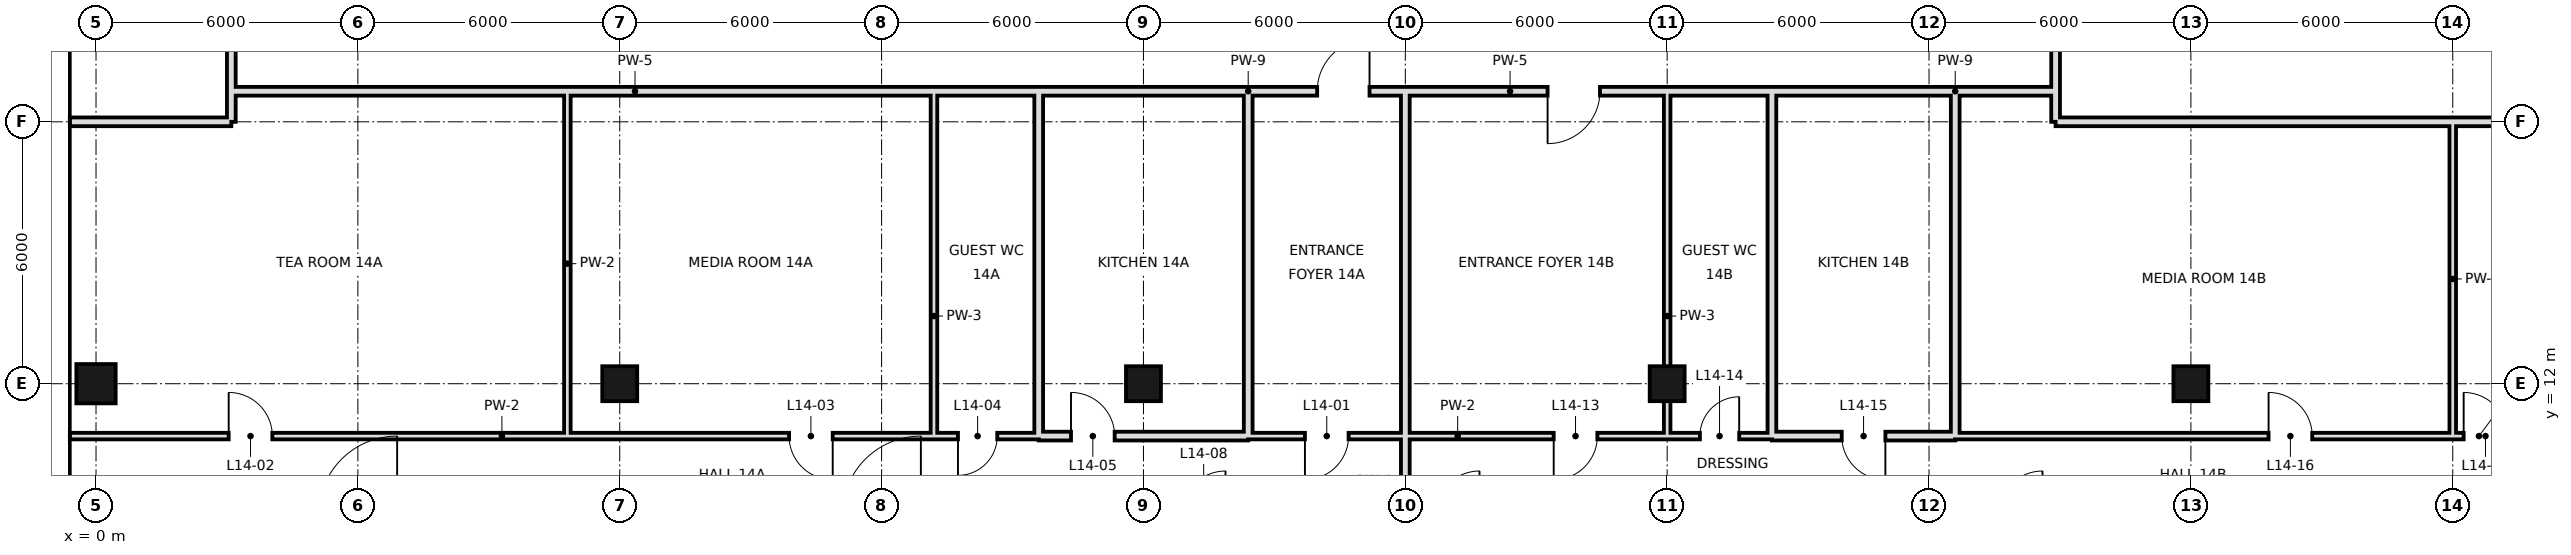
"""IFC4 building model, lengths in metres.
Left out: names, types, materials, properties, quantities, classifications, styles, units other than length and angle.
Written with IfcOpenShell. Run it as: python <this file> out.ifc"""

import sys

from ifc_helpers import new_model, si_unit, direction, frame, frame_2d, origin, origin_2d, place, context, subcontext, project, spatial, rectangle, hollow_rectangle, extrude, element, fill, save


model = new_model("IFC4")
c1 = context("Model", 3, precision=1e-05, world=origin(), true_north=direction((0.0, 1.0)))
c2 = subcontext(c1, "Body", "Model", "MODEL_VIEW")
j1 = project(units=[si_unit("LENGTHUNIT", "METRE"), si_unit("PLANEANGLEUNIT", "RADIAN")], contexts=[c1])
p1 = place(None, origin())
s1 = spatial("IfcSite", under=j1, at=p1, CompositionType="ELEMENT")
p2 = place(p1, origin())
s2 = spatial("IfcBuilding", under=s1, at=p2, CompositionType="ELEMENT")
p3 = place(p2, frame((0.0, 0.0, 71.4)))
s3 = spatial("IfcBuildingStorey", under=s2, at=p3, CompositionType="ELEMENT", Elevation=71.4)
p4 = place(p3, frame((0.0, 12.0, 0.0), z_axis=(0.0, 0.0, 1.0), x_axis=(1.0, 0.0, 0.0)))
e1 = element("IfcColumn", 1, at=p4, inside=s3, PredefinedType="COLUMN", context=c2, shape_type="SweptSolid", body=[
    extrude(hollow_rectangle(XDim=0.9, YDim=0.9, WallThickness=0.045, at=origin_2d()), origin(), (0.0, 0.0, 1.0), 3.6),
])
for number, where, z_axis, x_axis in (
    (2, (12.0, 12.0, 0.0), (0.0, 0.0, 1.0), (1.0, 0.0, 0.0)),
    (3, (24.0, 12.0, 0.0), (0.0, 0.0, 1.0), (1.0, 0.0, 0.0)),
    (4, (36.0, 12.0, 0.0), (0.0, 0.0, 1.0), (1.0, 0.0, 0.0)),
    (5, (48.0, 12.0, 0.0), (0.0, 0.0, 1.0), (1.0, 0.0, 0.0)),
):
    element("IfcColumn", number, at=place(p3, frame(where, z_axis=z_axis, x_axis=x_axis)), inside=s3, PredefinedType="COLUMN", context=c2, shape_type="SweptSolid", body=[
        extrude(hollow_rectangle(XDim=0.8, YDim=0.8, WallThickness=0.04, at=origin_2d()), origin(), (0.0, 0.0, 1.0), 3.6),
    ])
for number, where, z_axis, x_axis in (
    (6, (10.8, 10.8, 0.0), (0.0, 0.0, 1.0), (0.0, 1.0, 0.0)),
    (7, (19.2, 10.8, 0.0), (0.0, 0.0, 1.0), (0.0, 1.0, 0.0)),
):
    element("IfcWall", number, at=place(p3, frame(where, z_axis=z_axis, x_axis=x_axis)), inside=s3, PredefinedType="PARTITIONING", context=c2, shape_type="SweptSolid", body=[
        extrude(rectangle(XDim=7.9, YDim=0.15, at=frame_2d((3.95, 0.0))), origin(), (0.0, 0.0, 1.0), 3.42),
    ])
for number, where, z_axis, x_axis in (
    (8, (21.6, 10.8, 0.0), (0.0, 0.0, 1.0), (0.0, 1.0, 0.0)),
    (9, (26.4, 10.8, 0.0), (0.0, 0.0, 1.0), (0.0, 1.0, 0.0)),
):
    element("IfcWall", number, at=place(p3, frame(where, z_axis=z_axis, x_axis=x_axis)), inside=s3, PredefinedType="SOLIDWALL", context=c2, shape_type="SweptSolid", body=[
        extrude(rectangle(XDim=7.9, YDim=0.2, at=frame_2d((3.95, 0.0))), origin(), (0.0, 0.0, 1.0), 2.72),
    ])
p5 = place(p3, frame((3.1, 18.0, 0.0), z_axis=(0.0, 0.0, 1.0), x_axis=(0.0, 1.0, 0.0)))
e10 = element("IfcWall", 10, at=p5, inside=s3, PredefinedType="SOLIDWALL", context=c2, shape_type="SweptSolid", body=[
    extrude(rectangle(XDim=27.949, YDim=0.2, at=frame_2d((13.975, 0.0))), origin(), (0.0, 0.0, 1.0), 2.97),
])
p6 = place(p5, frame((8.36, 0.0, 0.0)))
e11 = element("IfcOpeningElement", 11, at=p6, cuts=e10, PredefinedType="OPENING", context=c2, shape_type="SweptSolid", body=[
    extrude(rectangle(XDim=1.2, YDim=2.4, at=frame_2d((0.6, 1.2))), frame((0.0, 0.11, 0.0), z_axis=(0.0, -1.0, 0.0), x_axis=(1.0, 0.0, 0.0)), (0.0, 0.0, 1.0), 0.22),
])
p7 = place(p3, frame((30.0, -0.6, 0.0), z_axis=(0.0, 0.0, 1.0), x_axis=(0.0, 1.0, 0.0)))
e12 = element("IfcWall", 12, at=p7, inside=s3, PredefinedType="SOLIDWALL", context=c2, shape_type="SweptSolid", body=[
    extrude(rectangle(XDim=19.3, YDim=0.2, at=frame_2d((9.65, 0.0))), origin(), (0.0, 0.0, 1.0), 2.72),
])
p8 = place(p3, frame((36.0, 10.8, 0.0), z_axis=(0.0, 0.0, 1.0), x_axis=(0.0, 1.0, 0.0)))
e13 = element("IfcWall", 13, at=p8, inside=s3, PredefinedType="PARTITIONING", context=c2, shape_type="SweptSolid", body=[
    extrude(rectangle(XDim=7.9, YDim=0.15, at=frame_2d((3.95, 0.0))), origin(), (0.0, 0.0, 1.0), 2.72),
])
for number, where, z_axis, x_axis in (
    (14, (38.4, 10.8, 0.0), (0.0, 0.0, 1.0), (0.0, 1.0, 0.0)),
    (15, (42.6, 10.8, 0.0), (0.0, 0.0, 1.0), (0.0, 1.0, 0.0)),
):
    element("IfcWall", number, at=place(p3, frame(where, z_axis=z_axis, x_axis=x_axis)), inside=s3, PredefinedType="SOLIDWALL", context=c2, shape_type="SweptSolid", body=[
        extrude(rectangle(XDim=7.9, YDim=0.2, at=frame_2d((3.95, 0.0))), origin(), (0.0, 0.0, 1.0), 2.72),
    ])
p9 = place(p3, frame((44.9, 18.7, 0.0), z_axis=(0.0, 0.0, 1.0), x_axis=(0.0, 1.0, 0.0)))
e16 = element("IfcWall", 16, at=p9, inside=s3, PredefinedType="SOLIDWALL", context=c2, shape_type="SweptSolid", body=[
    extrude(rectangle(XDim=7.1, YDim=0.2, at=frame_2d((3.55, 0.0))), origin(), (0.0, 0.0, 1.0), 3.42),
])
p10 = place(p3, frame((44.9, 18.0, 0.0), z_axis=(0.0, 0.0, 1.0), x_axis=(0.0, 1.0, 0.0)))
e17 = element("IfcWall", 17, at=p10, inside=s3, PredefinedType="SOLIDWALL", context=c2, shape_type="SweptSolid", body=[
    extrude(rectangle(XDim=0.7, YDim=0.2, at=frame_2d((0.35, 0.0))), origin(), (0.0, 0.0, 1.0), 2.97),
])
p11 = place(p3, frame((54.0, 10.8, 0.0), z_axis=(0.0, 0.0, 1.0), x_axis=(0.0, 1.0, 0.0)))
e18 = element("IfcWall", 18, at=p11, inside=s3, PredefinedType="PARTITIONING", context=c2, shape_type="SweptSolid", body=[
    extrude(rectangle(XDim=7.2, YDim=0.15, at=frame_2d((3.6, 0.0))), origin(), (0.0, 0.0, 1.0), 3.42),
])
p12 = place(p3, frame((21.6, 10.8, 0.0), z_axis=(0.0, 0.0, 1.0), x_axis=(1.0, 0.0, 0.0)))
e19 = element("IfcWall", 19, at=p12, inside=s3, PredefinedType="SOLIDWALL", context=c2, shape_type="SweptSolid", body=[
    extrude(rectangle(XDim=4.8, YDim=0.2, at=frame_2d((2.4, 0.0))), origin(), (0.0, 0.0, 1.0), 2.72),
])
p13 = place(p12, frame((0.74, 0.0, 0.0)))
e20 = element("IfcOpeningElement", 20, at=p13, cuts=e19, PredefinedType="OPENING", context=c2, shape_type="SweptSolid", body=[
    extrude(rectangle(XDim=1.0, YDim=2.4, at=frame_2d((0.5, 1.2))), frame((0.0, 0.11, 0.0), z_axis=(0.0, -1.0, 0.0), x_axis=(1.0, 0.0, 0.0)), (0.0, 0.0, 1.0), 0.22),
])
p14 = place(p3, frame((38.4, 10.8, 0.0), z_axis=(0.0, 0.0, 1.0), x_axis=(1.0, 0.0, 0.0)))
e21 = element("IfcWall", 21, at=p14, inside=s3, PredefinedType="SOLIDWALL", context=c2, shape_type="SweptSolid", body=[
    extrude(rectangle(XDim=4.2, YDim=0.2, at=frame_2d((2.1, 0.0))), origin(), (0.0, 0.0, 1.0), 2.72),
])
p15 = place(p14, frame((1.6, 0.0, 0.0)))
e22 = element("IfcOpeningElement", 22, at=p15, cuts=e21, PredefinedType="OPENING", context=c2, shape_type="SweptSolid", body=[
    extrude(rectangle(XDim=1.0, YDim=2.4, at=frame_2d((0.5, 1.2))), frame((0.0, 0.11, 0.0), z_axis=(0.0, -1.0, 0.0), x_axis=(1.0, 0.0, 0.0)), (0.0, 0.0, 1.0), 0.22),
])
p16 = place(p3, frame((-0.6, 10.8, 0.0), z_axis=(0.0, 0.0, 1.0), x_axis=(1.0, 0.0, 0.0)))
e23 = element("IfcWall", 23, at=p16, inside=s3, PredefinedType="PARTITIONING", context=c2, shape_type="SweptSolid", body=[
    extrude(rectangle(XDim=19.8, YDim=0.15, at=frame_2d((9.9, 0.0))), origin(), (0.0, 0.0, 1.0), 3.42),
])
p17 = place(p16, frame((3.64, 0.0, 0.0)))
e24 = element("IfcOpeningElement", 24, at=p17, cuts=e23, PredefinedType="OPENING", context=c2, shape_type="SweptSolid", body=[
    extrude(rectangle(XDim=1.0, YDim=2.4, at=frame_2d((0.5, 1.2))), frame((0.0, 0.085, 0.0), z_axis=(0.0, -1.0, 0.0), x_axis=(1.0, 0.0, 0.0)), (0.0, 0.0, 1.0), 0.17),
])
p18 = place(p16, frame((16.48, 0.0, 0.0)))
e25 = element("IfcOpeningElement", 25, at=p18, cuts=e23, PredefinedType="OPENING", context=c2, shape_type="SweptSolid", body=[
    extrude(rectangle(XDim=1.0, YDim=2.4, at=frame_2d((0.5, 1.2))), frame((0.0, 0.085, 0.0), z_axis=(0.0, -1.0, 0.0), x_axis=(1.0, 0.0, 0.0)), (0.0, 0.0, 1.0), 0.17),
])
p19 = place(p3, frame((26.4, 10.8, 0.0), z_axis=(0.0, 0.0, 1.0), x_axis=(1.0, 0.0, 0.0)))
e26 = element("IfcWall", 26, at=p19, inside=s3, PredefinedType="PARTITIONING", context=c2, shape_type="SweptSolid", body=[
    extrude(rectangle(XDim=9.6, YDim=0.15, at=frame_2d((4.8, 0.0))), origin(), (0.0, 0.0, 1.0), 3.42),
])
p20 = place(p19, frame((1.3, 0.0, 0.0)))
e27 = element("IfcOpeningElement", 27, at=p20, cuts=e26, PredefinedType="OPENING", context=c2, shape_type="SweptSolid", body=[
    extrude(rectangle(XDim=1.0, YDim=2.4, at=frame_2d((0.5, 1.2))), frame((0.0, 0.085, 0.0), z_axis=(0.0, -1.0, 0.0), x_axis=(1.0, 0.0, 0.0)), (0.0, 0.0, 1.0), 0.17),
])
p21 = place(p19, frame((7.0, 0.0, 0.0)))
e28 = element("IfcOpeningElement", 28, at=p21, cuts=e26, PredefinedType="OPENING", context=c2, shape_type="SweptSolid", body=[
    extrude(rectangle(XDim=1.0, YDim=2.4, at=frame_2d((0.5, 1.2))), frame((0.0, 0.085, 0.0), z_axis=(0.0, -1.0, 0.0), x_axis=(1.0, 0.0, 0.0)), (0.0, 0.0, 1.0), 0.17),
])
p22 = place(p3, frame((42.6, 10.8, 0.0), z_axis=(0.0, 0.0, 1.0), x_axis=(1.0, 0.0, 0.0)))
e29 = element("IfcWall", 29, at=p22, inside=s3, PredefinedType="PARTITIONING", context=c2, shape_type="SweptSolid", body=[
    extrude(rectangle(XDim=24.0, YDim=0.15, at=frame_2d((12.0, 0.0))), origin(), (0.0, 0.0, 1.0), 3.42),
])
p23 = place(p22, frame((7.18, 0.0, 0.0)))
e30 = element("IfcOpeningElement", 30, at=p23, cuts=e29, PredefinedType="OPENING", context=c2, shape_type="SweptSolid", body=[
    extrude(rectangle(XDim=1.0, YDim=2.4, at=frame_2d((0.5, 1.2))), frame((0.0, 0.085, 0.0), z_axis=(0.0, -1.0, 0.0), x_axis=(1.0, 0.0, 0.0)), (0.0, 0.0, 1.0), 0.17),
])
p24 = place(p22, frame((11.65, 0.0, 0.0)))
e31 = element("IfcOpeningElement", 31, at=p24, cuts=e29, PredefinedType="OPENING", context=c2, shape_type="SweptSolid", body=[
    extrude(rectangle(XDim=1.0, YDim=2.4, at=frame_2d((0.5, 1.2))), frame((0.0, 0.085, 0.0), z_axis=(0.0, -1.0, 0.0), x_axis=(1.0, 0.0, 0.0)), (0.0, 0.0, 1.0), 0.17),
])
p25 = place(p3, frame((19.2, 10.8, 0.0), z_axis=(0.0, 0.0, 1.0), x_axis=(1.0, 0.0, 0.0)))
e32 = element("IfcWall", 32, at=p25, inside=s3, PredefinedType="PARTITIONING", context=c2, shape_type="SweptSolid", body=[
    extrude(rectangle(XDim=2.4, YDim=0.15, at=frame_2d((1.2, 0.0))), origin(), (0.0, 0.0, 1.0), 3.42),
])
p26 = place(p25, frame((0.55, 0.0, 0.0)))
e33 = element("IfcOpeningElement", 33, at=p26, cuts=e32, PredefinedType="OPENING", context=c2, shape_type="SweptSolid", body=[
    extrude(rectangle(XDim=0.9, YDim=2.4, at=frame_2d((0.45, 1.2))), frame((0.0, 0.085, 0.0), z_axis=(0.0, -1.0, 0.0), x_axis=(1.0, 0.0, 0.0)), (0.0, 0.0, 1.0), 0.17),
])
p27 = place(p3, frame((36.0, 10.8, 0.0), z_axis=(0.0, 0.0, 1.0), x_axis=(1.0, 0.0, 0.0)))
e34 = element("IfcWall", 34, at=p27, inside=s3, PredefinedType="PARTITIONING", context=c2, shape_type="SweptSolid", body=[
    extrude(rectangle(XDim=2.4, YDim=0.15, at=frame_2d((1.2, 0.0))), origin(), (0.0, 0.0, 1.0), 3.42),
])
p28 = place(p27, frame((0.75, 0.0, 0.0)))
e35 = element("IfcOpeningElement", 35, at=p28, cuts=e34, PredefinedType="OPENING", context=c2, shape_type="SweptSolid", body=[
    extrude(rectangle(XDim=0.9, YDim=2.4, at=frame_2d((0.45, 1.2))), frame((0.0, 0.085, 0.0), z_axis=(0.0, -1.0, 0.0), x_axis=(1.0, 0.0, 0.0)), (0.0, 0.0, 1.0), 0.17),
])
p29 = place(p3, frame((-0.6, 18.0, 0.0), z_axis=(0.0, 0.0, 1.0), x_axis=(1.0, 0.0, 0.0)))
e36 = element("IfcWall", 36, at=p29, inside=s3, PredefinedType="SOLIDWALL", context=c2, shape_type="SweptSolid", body=[
    extrude(rectangle(XDim=3.7, YDim=0.2, at=frame_2d((1.85, 0.0))), origin(), (0.0, 0.0, 1.0), 2.72),
])
p30 = place(p3, frame((44.9, 18.0, 0.0), z_axis=(0.0, 0.0, 1.0), x_axis=(1.0, 0.0, 0.0)))
e37 = element("IfcWall", 37, at=p30, inside=s3, PredefinedType="SOLIDWALL", context=c2, shape_type="SweptSolid", body=[
    extrude(rectangle(XDim=21.7, YDim=0.2, at=frame_2d((10.85, 0.0))), origin(), (0.0, 0.0, 1.0), 2.52),
])
p31 = place(p3, frame((3.1, 18.7, 0.0), z_axis=(0.0, 0.0, 1.0), x_axis=(1.0, 0.0, 0.0)))
e38 = element("IfcWall", 38, at=p31, inside=s3, PredefinedType="SOLIDWALL", context=c2, shape_type="SweptSolid", body=[
    extrude(rectangle(XDim=18.5, YDim=0.2, at=frame_2d((9.25, 0.0))), origin(), (0.0, 0.0, 1.0), 2.72),
])
p32 = place(p3, frame((26.4, 18.7, 0.0), z_axis=(0.0, 0.0, 1.0), x_axis=(1.0, 0.0, 0.0)))
e39 = element("IfcWall", 39, at=p32, inside=s3, PredefinedType="SOLIDWALL", context=c2, shape_type="SweptSolid", body=[
    extrude(rectangle(XDim=12.0, YDim=0.2, at=frame_2d((6.0, 0.0))), origin(), (0.0, 0.0, 1.0), 2.72),
])
p33 = place(p32, frame((1.58, 0.0, 0.0)))
e40 = element("IfcOpeningElement", 40, at=p33, cuts=e39, PredefinedType="OPENING", context=c2, shape_type="SweptSolid", body=[
    extrude(rectangle(XDim=1.2, YDim=2.4, at=frame_2d((0.6, 1.2))), frame((0.0, 0.11, 0.0), z_axis=(0.0, -1.0, 0.0), x_axis=(1.0, 0.0, 0.0)), (0.0, 0.0, 1.0), 0.22),
])
p34 = place(p32, frame((6.86, 0.0, 0.0)))
e41 = element("IfcOpeningElement", 41, at=p34, cuts=e39, PredefinedType="OPENING", context=c2, shape_type="SweptSolid", body=[
    extrude(rectangle(XDim=1.2, YDim=2.4, at=frame_2d((0.6, 1.2))), frame((0.0, 0.11, 0.0), z_axis=(0.0, -1.0, 0.0), x_axis=(1.0, 0.0, 0.0)), (0.0, 0.0, 1.0), 0.22),
])
p35 = place(p3, frame((42.6, 18.7, 0.0), z_axis=(0.0, 0.0, 1.0), x_axis=(1.0, 0.0, 0.0)))
e42 = element("IfcWall", 42, at=p35, inside=s3, PredefinedType="SOLIDWALL", context=c2, shape_type="SweptSolid", body=[
    extrude(rectangle(XDim=2.3, YDim=0.2, at=frame_2d((1.15, 0.0))), origin(), (0.0, 0.0, 1.0), 3.42),
])
p36 = place(p3, frame((21.6, 18.7, 0.0), z_axis=(0.0, 0.0, 1.0), x_axis=(1.0, 0.0, 0.0)))
e43 = element("IfcWall", 43, at=p36, inside=s3, PredefinedType="SOLIDWALL", context=c2, shape_type="SweptSolid", body=[
    extrude(rectangle(XDim=4.8, YDim=0.2, at=frame_2d((2.4, 0.0))), origin(), (0.0, 0.0, 1.0), 3.42),
])
p37 = place(p3, frame((38.4, 18.7, 0.0), z_axis=(0.0, 0.0, 1.0), x_axis=(1.0, 0.0, 0.0)))
e44 = element("IfcWall", 44, at=p37, inside=s3, PredefinedType="SOLIDWALL", context=c2, shape_type="SweptSolid", body=[
    extrude(rectangle(XDim=4.2, YDim=0.2, at=frame_2d((2.1, 0.0))), origin(), (0.0, 0.0, 1.0), 2.72),
])
p38 = place(p20, frame((1.0, 0.0, 0.0), z_axis=(0.0, 0.0, 1.0), x_axis=(-1.0, 0.0, 0.0)))
e45 = element("IfcDoor", 45, at=p38, inside=s3, OperationType="SINGLE_SWING_RIGHT", PredefinedType="DOOR", context=c2, shape_type="SweptSolid", body=[
    extrude(rectangle(XDim=1.0, YDim=2.4, at=frame_2d((0.5, 1.2))), frame((0.0, 0.025, 0.0), z_axis=(0.0, -1.0, 0.0), x_axis=(1.0, 0.0, 0.0)), (0.0, 0.0, 1.0), 0.05),
])
fill(e27, e45)
p39 = place(p17, origin())
e46 = element("IfcDoor", 46, at=p39, inside=s3, OperationType="SINGLE_SWING_LEFT", PredefinedType="DOOR", context=c2, shape_type="SweptSolid", body=[
    extrude(rectangle(XDim=1.0, YDim=2.4, at=frame_2d((0.5, 1.2))), frame((0.0, 0.025, 0.0), z_axis=(0.0, -1.0, 0.0), x_axis=(1.0, 0.0, 0.0)), (0.0, 0.0, 1.0), 0.05),
])
fill(e24, e46)
p40 = place(p18, origin())
e47 = element("IfcDoor", 47, at=p40, inside=s3, OperationType="SINGLE_SWING_RIGHT", PredefinedType="DOOR", context=c2, shape_type="SweptSolid", body=[
    extrude(rectangle(XDim=1.0, YDim=2.4, at=frame_2d((0.5, 1.2))), frame((0.0, 0.025, 0.0), z_axis=(0.0, -1.0, 0.0), x_axis=(1.0, 0.0, 0.0)), (0.0, 0.0, 1.0), 0.05),
])
fill(e25, e47)
p41 = place(p26, frame((0.9, 0.0, 0.0), z_axis=(0.0, 0.0, 1.0), x_axis=(-1.0, 0.0, 0.0)))
e48 = element("IfcDoor", 48, at=p41, inside=s3, OperationType="SINGLE_SWING_RIGHT", PredefinedType="DOOR", context=c2, shape_type="SweptSolid", body=[
    extrude(rectangle(XDim=0.9, YDim=2.4, at=frame_2d((0.45, 1.2))), frame((0.0, 0.025, 0.0), z_axis=(0.0, -1.0, 0.0), x_axis=(1.0, 0.0, 0.0)), (0.0, 0.0, 1.0), 0.05),
])
fill(e33, e48)
p42 = place(p13, origin())
e49 = element("IfcDoor", 49, at=p42, inside=s3, OperationType="SINGLE_SWING_LEFT", PredefinedType="DOOR", context=c2, shape_type="SweptSolid", body=[
    extrude(rectangle(XDim=1.0, YDim=2.4, at=frame_2d((0.5, 1.2))), frame((0.0, 0.025, 0.0), z_axis=(0.0, -1.0, 0.0), x_axis=(1.0, 0.0, 0.0)), (0.0, 0.0, 1.0), 0.05),
])
fill(e20, e49)
p43 = place(p21, frame((1.0, 0.0, 0.0), z_axis=(0.0, 0.0, 1.0), x_axis=(-1.0, 0.0, 0.0)))
e50 = element("IfcDoor", 50, at=p43, inside=s3, OperationType="SINGLE_SWING_RIGHT", PredefinedType="DOOR", context=c2, shape_type="SweptSolid", body=[
    extrude(rectangle(XDim=1.0, YDim=2.4, at=frame_2d((0.5, 1.2))), frame((0.0, 0.025, 0.0), z_axis=(0.0, -1.0, 0.0), x_axis=(1.0, 0.0, 0.0)), (0.0, 0.0, 1.0), 0.05),
])
fill(e28, e50)
p44 = place(p28, frame((0.9, 0.0, 0.0), z_axis=(0.0, 0.0, 1.0), x_axis=(-1.0, 0.0, 0.0)))
e51 = element("IfcDoor", 51, at=p44, inside=s3, OperationType="SINGLE_SWING_LEFT", PredefinedType="DOOR", context=c2, shape_type="SweptSolid", body=[
    extrude(rectangle(XDim=0.9, YDim=2.4, at=frame_2d((0.45, 1.2))), frame((0.0, 0.025, 0.0), z_axis=(0.0, -1.0, 0.0), x_axis=(1.0, 0.0, 0.0)), (0.0, 0.0, 1.0), 0.05),
])
fill(e35, e51)
p45 = place(p15, origin())
e52 = element("IfcDoor", 52, at=p45, inside=s3, OperationType="SINGLE_SWING_RIGHT", PredefinedType="DOOR", context=c2, shape_type="SweptSolid", body=[
    extrude(rectangle(XDim=1.0, YDim=2.4, at=frame_2d((0.5, 1.2))), frame((0.0, 0.025, 0.0), z_axis=(0.0, -1.0, 0.0), x_axis=(1.0, 0.0, 0.0)), (0.0, 0.0, 1.0), 0.05),
])
fill(e22, e52)
p46 = place(p23, origin())
e53 = element("IfcDoor", 53, at=p46, inside=s3, OperationType="SINGLE_SWING_LEFT", PredefinedType="DOOR", context=c2, shape_type="SweptSolid", body=[
    extrude(rectangle(XDim=1.0, YDim=2.4, at=frame_2d((0.5, 1.2))), frame((0.0, 0.025, 0.0), z_axis=(0.0, -1.0, 0.0), x_axis=(1.0, 0.0, 0.0)), (0.0, 0.0, 1.0), 0.05),
])
fill(e30, e53)
p47 = place(p24, origin())
e54 = element("IfcDoor", 54, at=p47, inside=s3, OperationType="SINGLE_SWING_LEFT", PredefinedType="DOOR", context=c2, shape_type="SweptSolid", body=[
    extrude(rectangle(XDim=1.0, YDim=2.4, at=frame_2d((0.5, 1.2))), frame((0.0, 0.025, 0.0), z_axis=(0.0, -1.0, 0.0), x_axis=(1.0, 0.0, 0.0)), (0.0, 0.0, 1.0), 0.05),
])
fill(e31, e54)
p48 = place(p33, frame((1.2, 0.0, 0.0), z_axis=(0.0, 0.0, 1.0), x_axis=(-1.0, 0.0, 0.0)))
e55 = element("IfcDoor", 55, at=p48, inside=s3, OperationType="SINGLE_SWING_LEFT", PredefinedType="DOOR", context=c2, shape_type="SweptSolid", body=[
    extrude(rectangle(XDim=1.2, YDim=2.4, at=frame_2d((0.6, 1.2))), frame((0.0, 0.025, 0.0), z_axis=(0.0, -1.0, 0.0), x_axis=(1.0, 0.0, 0.0)), (0.0, 0.0, 1.0), 0.05),
])
fill(e40, e55)
p49 = place(p34, frame((1.2, 0.0, 0.0), z_axis=(0.0, 0.0, 1.0), x_axis=(-1.0, 0.0, 0.0)))
e56 = element("IfcDoor", 56, at=p49, inside=s3, OperationType="SINGLE_SWING_RIGHT", PredefinedType="DOOR", context=c2, shape_type="SweptSolid", body=[
    extrude(rectangle(XDim=1.2, YDim=2.4, at=frame_2d((0.6, 1.2))), frame((0.0, 0.025, 0.0), z_axis=(0.0, -1.0, 0.0), x_axis=(1.0, 0.0, 0.0)), (0.0, 0.0, 1.0), 0.05),
])
fill(e41, e56)
save(model, sys.argv[1])
